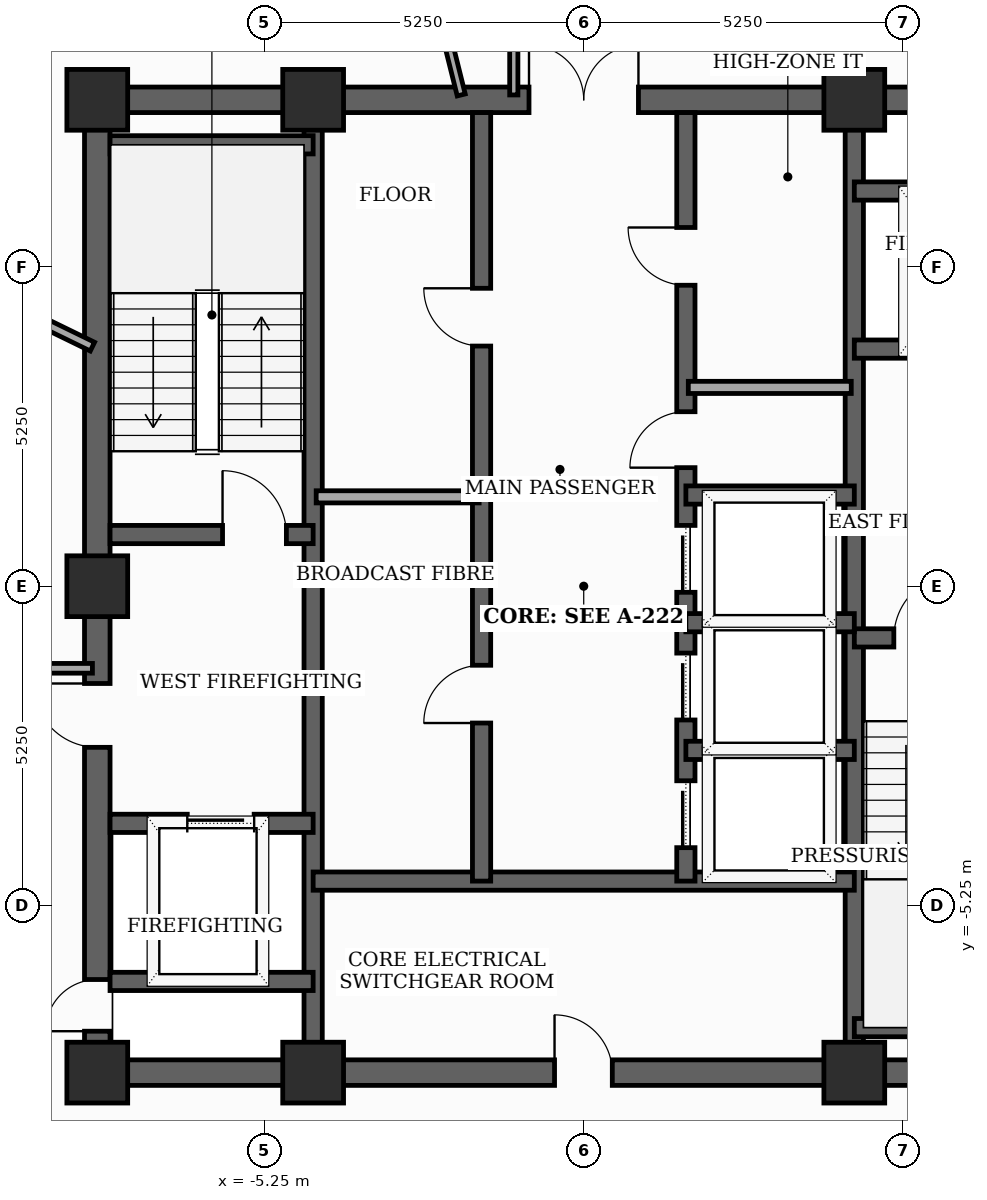
"""IFC4 building model, lengths in metres.
Left out: names, types, materials, properties, quantities, classifications, styles, units other than length and angle.
Written with IfcOpenShell. Run it as: python <this file> out.ifc"""

import sys

from ifc_helpers import new_model, si_unit, direction, frame, frame_2d, origin, origin_2d, place, context, subcontext, project, spatial, rectangle, extrude, element, fill, save


model = new_model("IFC4")
c1 = context("Model", 3, precision=1e-05, world=origin(), true_north=direction((0.0, 1.0)))
c2 = subcontext(c1, "Body", "Model", "MODEL_VIEW")
j1 = project(units=[si_unit("LENGTHUNIT", "METRE"), si_unit("PLANEANGLEUNIT", "RADIAN")], contexts=[c1])
p1 = place(None, origin())
s1 = spatial("IfcSite", under=j1, at=p1, CompositionType="ELEMENT")
p2 = place(p1, origin())
s2 = spatial("IfcBuilding", under=s1, at=p2, CompositionType="ELEMENT")
p3 = place(p2, frame((0.0, 0.0, 252.2)))
s3 = spatial("IfcBuildingStorey", under=s2, at=p3, CompositionType="ELEMENT", Elevation=252.2)
for number, where, z_axis, x_axis in (
    (1, (-8.0, -8.0, 0.0), (0.0, 0.0, 1.0), (1.0, 0.0, 0.0)),
    (2, (-4.45, -8.0, 0.0), (0.0, 0.0, 1.0), (1.0, 0.0, 0.0)),
    (3, (4.45, -8.0, 0.0), (0.0, 0.0, 1.0), (1.0, 0.0, 0.0)),
    (4, (4.45, 8.0, 0.0), (0.0, 0.0, 1.0), (1.0, 0.0, 0.0)),
    (5, (-4.45, 8.0, 0.0), (0.0, 0.0, 1.0), (1.0, 0.0, 0.0)),
    (6, (-8.0, 8.0, 0.0), (0.0, 0.0, 1.0), (1.0, 0.0, 0.0)),
    (7, (-8.0, 0.0, 0.0), (0.0, 0.0, 1.0), (1.0, 0.0, 0.0)),
):
    element("IfcColumn", number, at=place(p3, frame(where, z_axis=z_axis, x_axis=x_axis)), inside=s3, PredefinedType="COLUMN", context=c2, shape_type="SweptSolid", body=[
        extrude(rectangle(XDim=1.0, YDim=1.0, at=origin_2d()), origin(), (0.0, 0.0, 1.0), 3.7),
    ])
p4 = place(p3, frame((-8.0, -8.0, 0.0), z_axis=(0.0, 0.0, 1.0), x_axis=(0.0, 1.0, 0.0)))
e8 = element("IfcWall", 8, at=p4, inside=s3, PredefinedType="SHEAR", context=c2, shape_type="SweptSolid", body=[
    extrude(rectangle(XDim=16.0, YDim=0.42, at=frame_2d((8.0, 0.0))), origin(), (0.0, 0.0, 1.0), 3.5),
])
p5 = place(p4, frame((0.681, 0.0, 0.0)))
e9 = element("IfcOpeningElement", 9, at=p5, cuts=e8, PredefinedType="OPENING", context=c2, shape_type="SweptSolid", body=[
    extrude(rectangle(XDim=0.85, YDim=2.02, at=frame_2d((0.425, 1.01))), frame((0.0, 0.22, 0.0), z_axis=(0.0, -1.0, 0.0), x_axis=(1.0, 0.0, 0.0)), (0.0, 0.0, 1.0), 0.44),
])
p6 = place(p4, frame((5.35, 0.0, 0.0)))
e10 = element("IfcOpeningElement", 10, at=p6, cuts=e8, PredefinedType="OPENING", context=c2, shape_type="SweptSolid", body=[
    extrude(rectangle(XDim=1.05, YDim=2.15, at=frame_2d((0.525, 1.075))), frame((0.0, 0.22, 0.0), z_axis=(0.0, -1.0, 0.0), x_axis=(1.0, 0.0, 0.0)), (0.0, 0.0, 1.0), 0.44),
])
p7 = place(p3, frame((-8.0, -8.0, 0.0), z_axis=(0.0, 0.0, 1.0), x_axis=(1.0, 0.0, 0.0)))
e11 = element("IfcWall", 11, at=p7, inside=s3, PredefinedType="SHEAR", context=c2, shape_type="SweptSolid", body=[
    extrude(rectangle(XDim=16.0, YDim=0.42, at=frame_2d((8.0, 0.0))), origin(), (0.0, 0.0, 1.0), 3.5),
])
p8 = place(p7, frame((7.52, 0.0, 0.0)))
e12 = element("IfcOpeningElement", 12, at=p8, cuts=e11, PredefinedType="OPENING", context=c2, shape_type="SweptSolid", body=[
    extrude(rectangle(XDim=0.95, YDim=2.1, at=frame_2d((0.475, 1.05))), frame((0.0, 0.22, 0.0), z_axis=(0.0, -1.0, 0.0), x_axis=(1.0, 0.0, 0.0)), (0.0, 0.0, 1.0), 0.44),
])
p9 = place(p3, frame((-8.0, 8.0, 0.0), z_axis=(0.0, 0.0, 1.0), x_axis=(1.0, 0.0, 0.0)))
e13 = element("IfcWall", 13, at=p9, inside=s3, PredefinedType="SHEAR", context=c2, shape_type="SweptSolid", body=[
    extrude(rectangle(XDim=16.0, YDim=0.42, at=frame_2d((8.0, 0.0))), origin(), (0.0, 0.0, 1.0), 3.5),
])
p10 = place(p9, frame((7.1, 0.0, 0.0)))
e14 = element("IfcOpeningElement", 14, at=p10, cuts=e13, PredefinedType="OPENING", context=c2, shape_type="SweptSolid", body=[
    extrude(rectangle(XDim=1.8, YDim=2.15, at=frame_2d((0.9, 1.075))), frame((0.0, 0.22, 0.0), z_axis=(0.0, -1.0, 0.0), x_axis=(1.0, 0.0, 0.0)), (0.0, 0.0, 1.0), 0.44),
])
for number, where, z_axis, x_axis in (
    (15, (-4.45, -7.79, 0.0), (0.0, 0.0, 1.0), (0.0, 1.0, 0.0)),
    (16, (4.45, -7.79, 0.0), (0.0, 0.0, 1.0), (0.0, 1.0, 0.0)),
):
    element("IfcWall", number, at=place(p3, frame(where, z_axis=z_axis, x_axis=x_axis)), inside=s3, PredefinedType="SHEAR", context=c2, shape_type="SweptSolid", body=[
        extrude(rectangle(XDim=15.58, YDim=0.3, at=frame_2d((7.79, 0.0))), origin(), (0.0, 0.0, 1.0), 3.5),
    ])
p11 = place(p3, frame((-7.79, 0.85, 0.0), z_axis=(0.0, 0.0, 1.0), x_axis=(1.0, 0.0, 0.0)))
e17 = element("IfcWall", 17, at=p11, inside=s3, PredefinedType="SHEAR", context=c2, shape_type="SweptSolid", body=[
    extrude(rectangle(XDim=3.34, YDim=0.3, at=frame_2d((1.67, 0.0))), origin(), (0.0, 0.0, 1.0), 3.5),
])
p12 = place(p11, frame((1.85, 0.0, 0.0)))
e18 = element("IfcOpeningElement", 18, at=p12, cuts=e17, PredefinedType="OPENING", context=c2, shape_type="SweptSolid", body=[
    extrude(rectangle(XDim=1.05, YDim=2.15, at=frame_2d((0.525, 1.075))), frame((0.0, 0.16, 0.0), z_axis=(0.0, -1.0, 0.0), x_axis=(1.0, 0.0, 0.0)), (0.0, 0.0, 1.0), 0.32),
])
p13 = place(p3, frame((-7.79, 7.26, 0.0), z_axis=(0.0, 0.0, 1.0), x_axis=(1.0, 0.0, 0.0)))
e19 = element("IfcWall", 19, at=p13, inside=s3, PredefinedType="SHEAR", context=c2, shape_type="SweptSolid", body=[
    extrude(rectangle(XDim=3.34, YDim=0.3, at=frame_2d((1.67, 0.0))), origin(), (0.0, 0.0, 1.0), 3.5),
])
p14 = place(p3, frame((4.45, -0.85, 0.0), z_axis=(0.0, 0.0, 1.0), x_axis=(1.0, 0.0, 0.0)))
e20 = element("IfcWall", 20, at=p14, inside=s3, PredefinedType="SHEAR", context=c2, shape_type="SweptSolid", body=[
    extrude(rectangle(XDim=3.34, YDim=0.3, at=frame_2d((1.67, 0.0))), origin(), (0.0, 0.0, 1.0), 3.5),
])
p15 = place(p14, frame((0.65, 0.0, 0.0)))
e21 = element("IfcOpeningElement", 21, at=p15, cuts=e20, PredefinedType="OPENING", context=c2, shape_type="SweptSolid", body=[
    extrude(rectangle(XDim=1.05, YDim=2.15, at=frame_2d((0.525, 1.075))), frame((0.0, 0.16, 0.0), z_axis=(0.0, -1.0, 0.0), x_axis=(1.0, 0.0, 0.0)), (0.0, 0.0, 1.0), 0.32),
])
p16 = place(p3, frame((4.45, -7.26, 0.0), z_axis=(0.0, 0.0, 1.0), x_axis=(1.0, 0.0, 0.0)))
e22 = element("IfcWall", 22, at=p16, inside=s3, PredefinedType="SHEAR", context=c2, shape_type="SweptSolid", body=[
    extrude(rectangle(XDim=3.55, YDim=0.3, at=frame_2d((1.775, 0.0))), origin(), (0.0, 0.0, 1.0), 3.5),
])
p17 = place(p3, frame((-7.79, -3.9, 0.0), z_axis=(0.0, 0.0, 1.0), x_axis=(1.0, 0.0, 0.0)))
e23 = element("IfcWall", 23, at=p17, inside=s3, PredefinedType="SHEAR", context=c2, shape_type="SweptSolid", body=[
    extrude(rectangle(XDim=3.34, YDim=0.3, at=frame_2d((1.67, 0.0))), origin(), (0.0, 0.0, 1.0), 3.5),
])
p18 = place(p17, frame((1.27, 0.0, 0.0)))
e24 = element("IfcOpeningElement", 24, at=p18, cuts=e23, PredefinedType="OPENING", context=c2, shape_type="SweptSolid", body=[
    extrude(rectangle(XDim=1.1, YDim=2.1, at=frame_2d((0.55, 1.05))), frame((0.0, 0.16, 0.0), z_axis=(0.0, -1.0, 0.0), x_axis=(1.0, 0.0, 0.0)), (0.0, 0.0, 1.0), 0.32),
])
p19 = place(p3, frame((-7.79, -6.5, 0.0), z_axis=(0.0, 0.0, 1.0), x_axis=(1.0, 0.0, 0.0)))
e25 = element("IfcWall", 25, at=p19, inside=s3, PredefinedType="SHEAR", context=c2, shape_type="SweptSolid", body=[
    extrude(rectangle(XDim=3.34, YDim=0.3, at=frame_2d((1.67, 0.0))), origin(), (0.0, 0.0, 1.0), 3.5),
])
p20 = place(p3, frame((4.45, 3.9, 0.0), z_axis=(0.0, 0.0, 1.0), x_axis=(1.0, 0.0, 0.0)))
e26 = element("IfcWall", 26, at=p20, inside=s3, PredefinedType="SHEAR", context=c2, shape_type="SweptSolid", body=[
    extrude(rectangle(XDim=3.34, YDim=0.3, at=frame_2d((1.67, 0.0))), origin(), (0.0, 0.0, 1.0), 3.5),
])
p21 = place(p20, frame((1.18, 0.0, 0.0)))
e27 = element("IfcOpeningElement", 27, at=p21, cuts=e26, PredefinedType="OPENING", context=c2, shape_type="SweptSolid", body=[
    extrude(rectangle(XDim=1.1, YDim=2.1, at=frame_2d((0.55, 1.05))), frame((0.0, 0.16, 0.0), z_axis=(0.0, -1.0, 0.0), x_axis=(1.0, 0.0, 0.0)), (0.0, 0.0, 1.0), 0.32),
])
p22 = place(p3, frame((4.45, 6.5, 0.0), z_axis=(0.0, 0.0, 1.0), x_axis=(1.0, 0.0, 0.0)))
e28 = element("IfcWall", 28, at=p22, inside=s3, PredefinedType="SHEAR", context=c2, shape_type="SweptSolid", body=[
    extrude(rectangle(XDim=3.34, YDim=0.3, at=frame_2d((1.67, 0.0))), origin(), (0.0, 0.0, 1.0), 3.5),
])
p23 = place(p3, frame((-4.45, -4.85, 0.0), z_axis=(0.0, 0.0, 1.0), x_axis=(1.0, 0.0, 0.0)))
e29 = element("IfcWall", 29, at=p23, inside=s3, PredefinedType="SHEAR", context=c2, shape_type="SweptSolid", body=[
    extrude(rectangle(XDim=8.9, YDim=0.3, at=frame_2d((4.45, 0.0))), origin(), (0.0, 0.0, 1.0), 3.5),
])
p24 = place(p3, frame((-1.68, -4.85, 0.0), z_axis=(0.0, 0.0, 1.0), x_axis=(0.0, 1.0, 0.0)))
e30 = element("IfcWall", 30, at=p24, inside=s3, PredefinedType="SHEAR", context=c2, shape_type="SweptSolid", body=[
    extrude(rectangle(XDim=12.64, YDim=0.3, at=frame_2d((6.32, 0.0))), origin(), (0.0, 0.0, 1.0), 3.5),
])
p25 = place(p24, frame((2.6, 0.0, 0.0)))
e31 = element("IfcOpeningElement", 31, at=p25, cuts=e30, PredefinedType="OPENING", context=c2, shape_type="SweptSolid", body=[
    extrude(rectangle(XDim=0.95, YDim=2.1, at=frame_2d((0.475, 1.05))), frame((0.0, 0.16, 0.0), z_axis=(0.0, -1.0, 0.0), x_axis=(1.0, 0.0, 0.0)), (0.0, 0.0, 1.0), 0.32),
])
p26 = place(p24, frame((8.8, 0.0, 0.0)))
e32 = element("IfcOpeningElement", 32, at=p26, cuts=e30, PredefinedType="OPENING", context=c2, shape_type="SweptSolid", body=[
    extrude(rectangle(XDim=0.95, YDim=2.1, at=frame_2d((0.475, 1.05))), frame((0.0, 0.16, 0.0), z_axis=(0.0, -1.0, 0.0), x_axis=(1.0, 0.0, 0.0)), (0.0, 0.0, 1.0), 0.32),
])
p27 = place(p3, frame((1.68, -4.85, 0.0), z_axis=(0.0, 0.0, 1.0), x_axis=(0.0, 1.0, 0.0)))
e33 = element("IfcWall", 33, at=p27, inside=s3, PredefinedType="SHEAR", context=c2, shape_type="SweptSolid", body=[
    extrude(rectangle(XDim=12.64, YDim=0.3, at=frame_2d((6.32, 0.0))), origin(), (0.0, 0.0, 1.0), 3.5),
])
p28 = place(p27, frame((0.55, 0.0, 0.0)))
e34 = element("IfcOpeningElement", 34, at=p28, cuts=e33, PredefinedType="OPENING", context=c2, shape_type="SweptSolid", body=[
    extrude(rectangle(XDim=1.1, YDim=2.1, at=frame_2d((0.55, 1.05))), frame((0.0, 0.16, 0.0), z_axis=(0.0, -1.0, 0.0), x_axis=(1.0, 0.0, 0.0)), (0.0, 0.0, 1.0), 0.32),
])
p29 = place(p27, frame((2.65, 0.0, 0.0)))
e35 = element("IfcOpeningElement", 35, at=p29, cuts=e33, PredefinedType="OPENING", context=c2, shape_type="SweptSolid", body=[
    extrude(rectangle(XDim=1.1, YDim=2.1, at=frame_2d((0.55, 1.05))), frame((0.0, 0.16, 0.0), z_axis=(0.0, -1.0, 0.0), x_axis=(1.0, 0.0, 0.0)), (0.0, 0.0, 1.0), 0.32),
])
p30 = place(p27, frame((4.75, 0.0, 0.0)))
e36 = element("IfcOpeningElement", 36, at=p30, cuts=e33, PredefinedType="OPENING", context=c2, shape_type="SweptSolid", body=[
    extrude(rectangle(XDim=1.1, YDim=2.1, at=frame_2d((0.55, 1.05))), frame((0.0, 0.16, 0.0), z_axis=(0.0, -1.0, 0.0), x_axis=(1.0, 0.0, 0.0)), (0.0, 0.0, 1.0), 0.32),
])
p31 = place(p27, frame((6.8, 0.0, 0.0)))
e37 = element("IfcOpeningElement", 37, at=p31, cuts=e33, PredefinedType="OPENING", context=c2, shape_type="SweptSolid", body=[
    extrude(rectangle(XDim=0.92, YDim=2.1, at=frame_2d((0.46, 1.05))), frame((0.0, 0.16, 0.0), z_axis=(0.0, -1.0, 0.0), x_axis=(1.0, 0.0, 0.0)), (0.0, 0.0, 1.0), 0.32),
])
p32 = place(p27, frame((9.8, 0.0, 0.0)))
e38 = element("IfcOpeningElement", 38, at=p32, cuts=e33, PredefinedType="OPENING", context=c2, shape_type="SweptSolid", body=[
    extrude(rectangle(XDim=0.95, YDim=2.1, at=frame_2d((0.475, 1.05))), frame((0.0, 0.16, 0.0), z_axis=(0.0, -1.0, 0.0), x_axis=(1.0, 0.0, 0.0)), (0.0, 0.0, 1.0), 0.32),
])
for number, where, z_axis, x_axis in (
    (39, (1.68, 1.5, 0.0), (0.0, 0.0, 1.0), (1.0, 0.0, 0.0)),
    (40, (1.68, -2.7, 0.0), (0.0, 0.0, 1.0), (1.0, 0.0, 0.0)),
    (41, (1.68, -0.6, 0.0), (0.0, 0.0, 1.0), (1.0, 0.0, 0.0)),
):
    element("IfcWall", number, at=place(p3, frame(where, z_axis=z_axis, x_axis=x_axis)), inside=s3, PredefinedType="SHEAR", context=c2, shape_type="SweptSolid", body=[
        extrude(rectangle(XDim=2.77, YDim=0.3, at=frame_2d((1.385, 0.0))), origin(), (0.0, 0.0, 1.0), 3.5),
    ])
for number, where, z_axis, x_axis in (
    (42, (-4.4, 1.47, 0.0), (0.0, 0.0, 1.0), (1.0, 0.0, 0.0)),
    (43, (1.72, 3.27, 0.0), (0.0, 0.0, 1.0), (1.0, 0.0, 0.0)),
):
    element("IfcWall", number, at=place(p3, frame(where, z_axis=z_axis, x_axis=x_axis)), inside=s3, PredefinedType="SOLIDWALL", context=c2, shape_type="SweptSolid", body=[
        extrude(rectangle(XDim=2.68, YDim=0.2, at=frame_2d((1.34, 0.0))), origin(), (0.0, 0.0, 1.0), 3.5),
    ])
p33 = place(p3, frame((-8.08, -1.35, 0.0), z_axis=(0.0, 0.0, 1.0), x_axis=(-1.0, 0.0, 0.0)))
e44 = element("IfcWall", 44, at=p33, inside=s3, PredefinedType="PARTITIONING", context=c2, shape_type="SweptSolid", body=[
    extrude(rectangle(XDim=2.57, YDim=0.16, at=frame_2d((1.285, 0.0))), origin(), (0.0, 0.0, 1.0), 2.885),
])
p34 = place(p3, frame((-1.15, 10.65, 0.0), z_axis=(0.0, 0.0, 1.0), x_axis=(0.0, -1.0, 0.0)))
e45 = element("IfcWall", 45, at=p34, inside=s3, PredefinedType="PARTITIONING", context=c2, shape_type="SweptSolid", body=[
    extrude(rectangle(XDim=2.57, YDim=0.135, at=frame_2d((1.285, 0.0))), origin(), (0.0, 0.0, 1.0), 2.885),
])
p35 = place(p3, frame((-8.08, 3.941, 0.0), z_axis=(0.0, 0.0, 1.0), x_axis=(-0.898794985177, 0.438369221798, 0.0)))
e46 = element("IfcWall", 46, at=p35, inside=s3, PredefinedType="PARTITIONING", context=c2, shape_type="SweptSolid", body=[
    extrude(rectangle(XDim=6.719, YDim=0.16, at=frame_2d((3.359, 0.0))), origin(), (0.0, 0.0, 1.0), 2.885),
])
p36 = place(p3, frame((-3.8, 15.242, 0.0), z_axis=(0.0, 0.0, 1.0), x_axis=(0.241889603588, -0.970303777008, 0.0)))
e47 = element("IfcWall", 47, at=p36, inside=s3, PredefinedType="PARTITIONING", context=c2, shape_type="SweptSolid", body=[
    extrude(rectangle(XDim=7.381, YDim=0.135, at=frame_2d((3.69, 0.0))), origin(), (0.0, 0.0, 1.0), 2.885),
])
p37 = place(p36, frame((3.231, 0.0, 0.0)))
e48 = element("IfcOpeningElement", 48, at=p37, cuts=e47, PredefinedType="OPENING", context=c2, shape_type="SweptSolid", body=[
    extrude(rectangle(XDim=0.92, YDim=2.1, at=frame_2d((0.46, 1.05))), frame((0.0, 0.077, 0.0), z_axis=(0.0, -1.0, 0.0), x_axis=(1.0, 0.0, 0.0)), (0.0, 0.0, 1.0), 0.155),
])
p38 = place(p5, origin())
e49 = element("IfcDoor", 49, at=p38, inside=s3, OperationType="SINGLE_SWING_LEFT", PredefinedType="TRAPDOOR", context=c2, shape_type="SweptSolid", body=[
    extrude(rectangle(XDim=0.85, YDim=2.02, at=frame_2d((0.425, 1.01))), frame((0.0, 0.025, 0.0), z_axis=(0.0, -1.0, 0.0), x_axis=(1.0, 0.0, 0.0)), (0.0, 0.0, 1.0), 0.05),
])
fill(e9, e49)
p39 = place(p6, origin())
e50 = element("IfcDoor", 50, at=p39, inside=s3, OperationType="SINGLE_SWING_RIGHT", PredefinedType="DOOR", context=c2, shape_type="SweptSolid", body=[
    extrude(rectangle(XDim=1.05, YDim=2.15, at=frame_2d((0.525, 1.075))), frame((0.0, 0.025, 0.0), z_axis=(0.0, -1.0, 0.0), x_axis=(1.0, 0.0, 0.0)), (0.0, 0.0, 1.0), 0.05),
])
fill(e10, e50)
p40 = place(p8, origin())
e51 = element("IfcDoor", 51, at=p40, inside=s3, OperationType="SINGLE_SWING_LEFT", PredefinedType="DOOR", context=c2, shape_type="SweptSolid", body=[
    extrude(rectangle(XDim=0.95, YDim=2.1, at=frame_2d((0.475, 1.05))), frame((0.0, 0.025, 0.0), z_axis=(0.0, -1.0, 0.0), x_axis=(1.0, 0.0, 0.0)), (0.0, 0.0, 1.0), 0.05),
])
fill(e12, e51)
p41 = place(p10, origin())
e52 = element("IfcDoor", 52, at=p41, inside=s3, OperationType="DOUBLE_DOOR_SINGLE_SWING", PredefinedType="DOOR", context=c2, shape_type="SweptSolid", body=[
    extrude(rectangle(XDim=1.8, YDim=2.15, at=frame_2d((0.9, 1.075))), frame((0.0, 0.025, 0.0), z_axis=(0.0, -1.0, 0.0), x_axis=(1.0, 0.0, 0.0)), (0.0, 0.0, 1.0), 0.05),
])
fill(e14, e52)
p42 = place(p12, origin())
e53 = element("IfcDoor", 53, at=p42, inside=s3, OperationType="SINGLE_SWING_LEFT", PredefinedType="DOOR", context=c2, shape_type="SweptSolid", body=[
    extrude(rectangle(XDim=1.05, YDim=2.15, at=frame_2d((0.525, 1.075))), frame((0.0, 0.025, 0.0), z_axis=(0.0, -1.0, 0.0), x_axis=(1.0, 0.0, 0.0)), (0.0, 0.0, 1.0), 0.05),
])
fill(e18, e53)
p43 = place(p15, origin())
e54 = element("IfcDoor", 54, at=p43, inside=s3, OperationType="SINGLE_SWING_RIGHT", PredefinedType="DOOR", context=c2, shape_type="SweptSolid", body=[
    extrude(rectangle(XDim=1.05, YDim=2.15, at=frame_2d((0.525, 1.075))), frame((0.0, 0.025, 0.0), z_axis=(0.0, -1.0, 0.0), x_axis=(1.0, 0.0, 0.0)), (0.0, 0.0, 1.0), 0.05),
])
fill(e21, e54)
p44 = place(p18, origin())
e55 = element("IfcDoor", 55, at=p44, inside=s3, OperationType="SLIDING_TO_LEFT", PredefinedType="DOOR", context=c2, shape_type="SweptSolid", body=[
    extrude(rectangle(XDim=1.1, YDim=2.1, at=frame_2d((0.55, 1.05))), frame((0.0, 0.025, 0.0), z_axis=(0.0, -1.0, 0.0), x_axis=(1.0, 0.0, 0.0)), (0.0, 0.0, 1.0), 0.05),
])
fill(e24, e55)
p45 = place(p25, origin())
e56 = element("IfcDoor", 56, at=p45, inside=s3, OperationType="SINGLE_SWING_LEFT", PredefinedType="DOOR", context=c2, shape_type="SweptSolid", body=[
    extrude(rectangle(XDim=0.95, YDim=2.1, at=frame_2d((0.475, 1.05))), frame((0.0, 0.025, 0.0), z_axis=(0.0, -1.0, 0.0), x_axis=(1.0, 0.0, 0.0)), (0.0, 0.0, 1.0), 0.05),
])
fill(e31, e56)
p46 = place(p26, origin())
e57 = element("IfcDoor", 57, at=p46, inside=s3, OperationType="SINGLE_SWING_RIGHT", PredefinedType="DOOR", context=c2, shape_type="SweptSolid", body=[
    extrude(rectangle(XDim=0.95, YDim=2.1, at=frame_2d((0.475, 1.05))), frame((0.0, 0.025, 0.0), z_axis=(0.0, -1.0, 0.0), x_axis=(1.0, 0.0, 0.0)), (0.0, 0.0, 1.0), 0.05),
])
fill(e32, e57)
p47 = place(p28, origin())
e58 = element("IfcDoor", 58, at=p47, inside=s3, OperationType="SLIDING_TO_LEFT", PredefinedType="DOOR", context=c2, shape_type="SweptSolid", body=[
    extrude(rectangle(XDim=1.1, YDim=2.1, at=frame_2d((0.55, 1.05))), frame((0.0, 0.025, 0.0), z_axis=(0.0, -1.0, 0.0), x_axis=(1.0, 0.0, 0.0)), (0.0, 0.0, 1.0), 0.05),
])
fill(e34, e58)
p48 = place(p29, origin())
e59 = element("IfcDoor", 59, at=p48, inside=s3, OperationType="SLIDING_TO_LEFT", PredefinedType="DOOR", context=c2, shape_type="SweptSolid", body=[
    extrude(rectangle(XDim=1.1, YDim=2.1, at=frame_2d((0.55, 1.05))), frame((0.0, 0.025, 0.0), z_axis=(0.0, -1.0, 0.0), x_axis=(1.0, 0.0, 0.0)), (0.0, 0.0, 1.0), 0.05),
])
fill(e35, e59)
p49 = place(p30, origin())
e60 = element("IfcDoor", 60, at=p49, inside=s3, OperationType="SLIDING_TO_LEFT", PredefinedType="DOOR", context=c2, shape_type="SweptSolid", body=[
    extrude(rectangle(XDim=1.1, YDim=2.1, at=frame_2d((0.55, 1.05))), frame((0.0, 0.025, 0.0), z_axis=(0.0, -1.0, 0.0), x_axis=(1.0, 0.0, 0.0)), (0.0, 0.0, 1.0), 0.05),
])
fill(e36, e60)
p50 = place(p31, origin())
e61 = element("IfcDoor", 61, at=p50, inside=s3, OperationType="SINGLE_SWING_LEFT", PredefinedType="DOOR", context=c2, shape_type="SweptSolid", body=[
    extrude(rectangle(XDim=0.92, YDim=2.1, at=frame_2d((0.46, 1.05))), frame((0.0, 0.025, 0.0), z_axis=(0.0, -1.0, 0.0), x_axis=(1.0, 0.0, 0.0)), (0.0, 0.0, 1.0), 0.05),
])
fill(e37, e61)
p51 = place(p32, origin())
e62 = element("IfcDoor", 62, at=p51, inside=s3, OperationType="SINGLE_SWING_RIGHT", PredefinedType="DOOR", context=c2, shape_type="SweptSolid", body=[
    extrude(rectangle(XDim=0.95, YDim=2.1, at=frame_2d((0.475, 1.05))), frame((0.0, 0.025, 0.0), z_axis=(0.0, -1.0, 0.0), x_axis=(1.0, 0.0, 0.0)), (0.0, 0.0, 1.0), 0.05),
])
fill(e38, e62)
save(model, sys.argv[1])
